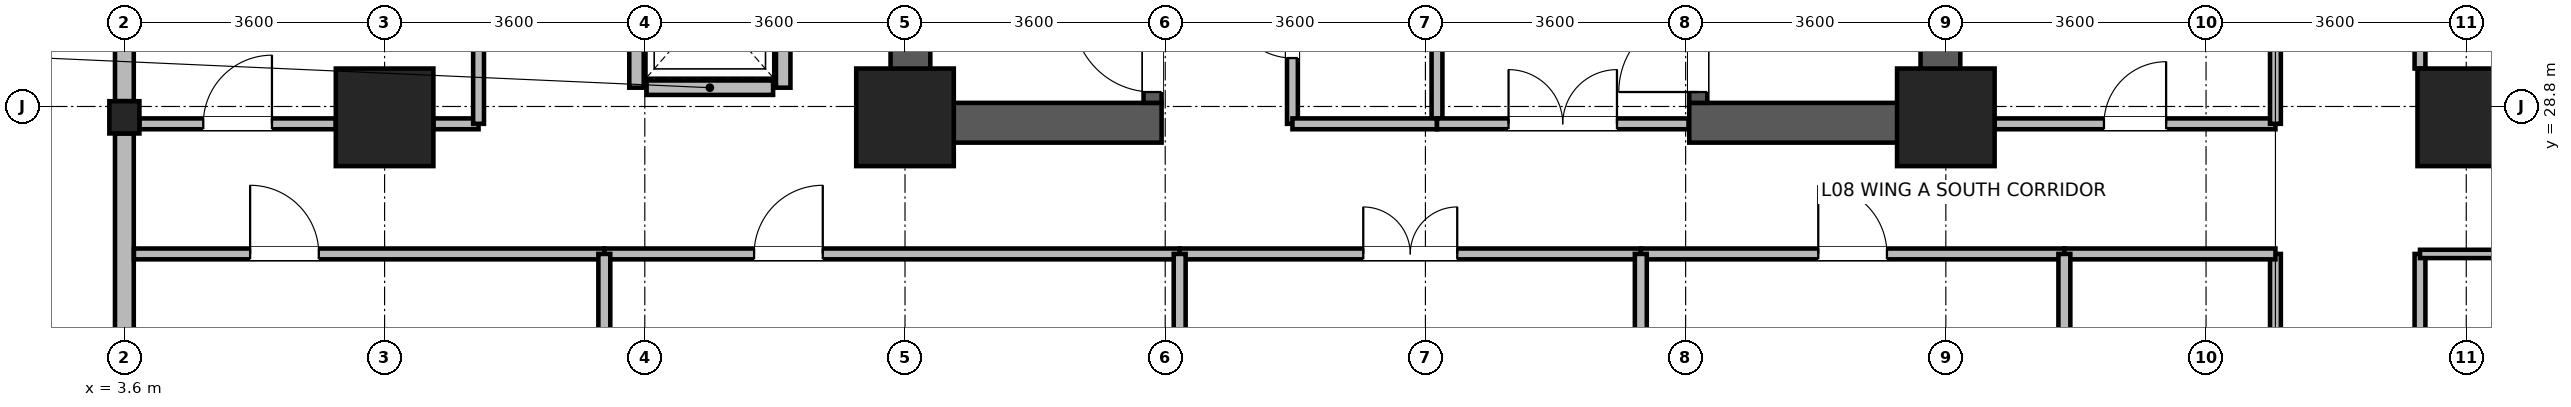
"""IFC4 building model, lengths in metres.
Left out: names, types, materials, properties, quantities, classifications, styles, units other than length and angle.
Written with IfcOpenShell. Run it as: python <this file> out.ifc"""

import sys

from ifc_helpers import new_model, si_unit, direction, frame, frame_2d, origin, origin_2d, place, context, subcontext, project, spatial, rectangle, i_section, extrude, source, transform, mapped, element, fill, save


model = new_model("IFC4")
c1 = context("Model", 3, precision=1e-05, world=origin(), true_north=direction((0.0, 1.0)))
c2 = subcontext(c1, "Body", "Model", "MODEL_VIEW")
j1 = project(units=[si_unit("LENGTHUNIT", "METRE"), si_unit("PLANEANGLEUNIT", "RADIAN")], contexts=[c1])
p1 = place(None, origin())
s1 = spatial("IfcSite", under=j1, at=p1, CompositionType="ELEMENT")
p2 = place(p1, origin())
s2 = spatial("IfcBuilding", under=s1, at=p2, CompositionType="ELEMENT")
p3 = place(p2, frame((0.0, 0.0, 36.4)))
s3 = spatial("IfcBuildingStorey", under=s2, at=p3, CompositionType="ELEMENT", Elevation=36.4)
for number, where, z_axis, x_axis in (
    (1, (14.475, 28.3, 0.0), (0.0, 0.0, 1.0), (0.0, 1.0, 0.0)),
    (2, (28.725, 28.3, 0.0), (0.0, 0.0, 1.0), (0.0, 1.0, 0.0)),
):
    element("IfcWall", number, at=place(p3, frame(where, z_axis=z_axis, x_axis=x_axis)), inside=s3, PredefinedType="SHEAR", context=c2, shape_type="SweptSolid", body=[
        extrude(rectangle(XDim=8.1, YDim=0.55, at=frame_2d((4.05, 0.0))), origin(), (0.0, 0.0, 1.0), 3.45),
    ])
for number, where, z_axis, x_axis in (
    (3, (14.75, 28.575, 0.0), (0.0, 0.0, 1.0), (1.0, 0.0, 0.0)),
    (4, (25.25, 28.575, 0.0), (0.0, 0.0, 1.0), (1.0, 0.0, 0.0)),
):
    element("IfcWall", number, at=place(p3, frame(where, z_axis=z_axis, x_axis=x_axis)), inside=s3, PredefinedType="SHEAR", context=c2, shape_type="SweptSolid", body=[
        extrude(rectangle(XDim=3.2, YDim=0.55, at=frame_2d((1.6, 0.0))), origin(), (0.0, 0.0, 1.0), 3.45),
    ])
p4 = place(p3, frame((17.825, 28.85, 0.0), z_axis=(0.0, 0.0, 1.0), x_axis=(0.0, 1.0, 0.0)))
e5 = element("IfcWall", 5, at=p4, inside=s3, PredefinedType="SHEAR", context=c2, shape_type="SweptSolid", body=[
    extrude(rectangle(XDim=7.0, YDim=0.25, at=frame_2d((3.5, 0.0))), origin(), (0.0, 0.0, 1.0), 3.45),
])
p5 = place(p4, frame((0.15, 0.0, 0.0)))
e6 = element("IfcOpeningElement", 6, at=p5, cuts=e5, PredefinedType="OPENING", context=c2, shape_type="SweptSolid", body=[
    extrude(rectangle(XDim=1.1, YDim=2.08, at=frame_2d((0.55, 1.04))), frame((0.0, 0.135, 0.0), z_axis=(0.0, -1.0, 0.0), x_axis=(1.0, 0.0, 0.0)), (0.0, 0.0, 1.0), 0.27),
])
p6 = place(p3, frame((25.375, 28.85, 0.0), z_axis=(0.0, 0.0, 1.0), x_axis=(0.0, 1.0, 0.0)))
e7 = element("IfcWall", 7, at=p6, inside=s3, PredefinedType="SHEAR", context=c2, shape_type="SweptSolid", body=[
    extrude(rectangle(XDim=7.0, YDim=0.25, at=frame_2d((3.5, 0.0))), origin(), (0.0, 0.0, 1.0), 3.45),
])
p7 = place(p6, frame((0.15, 0.0, 0.0)))
e8 = element("IfcOpeningElement", 8, at=p7, cuts=e7, PredefinedType="OPENING", context=c2, shape_type="SweptSolid", body=[
    extrude(rectangle(XDim=1.1, YDim=2.08, at=frame_2d((0.55, 1.04))), frame((0.0, 0.135, 0.0), z_axis=(0.0, -1.0, 0.0), x_axis=(1.0, 0.0, 0.0)), (0.0, 0.0, 1.0), 0.27),
])
m1 = source(origin(), c2, "Body", "SweptSolid", [
    extrude(rectangle(XDim=1.35, YDim=1.35, at=origin_2d()), origin(), (0.0, 0.0, 1.0), 3.7),
])
for number, where, z_axis, x_axis in (
    (9, (7.2, 28.65, 0.0), (0.0, 0.0, 1.0), (1.0, 0.0, 0.0)),
    (10, (14.4, 28.65, 0.0), (0.0, 0.0, 1.0), (1.0, 0.0, 0.0)),
    (11, (28.8, 28.65, 0.0), (0.0, 0.0, 1.0), (1.0, 0.0, 0.0)),
    (12, (36.0, 28.65, 0.0), (0.0, 0.0, 1.0), (1.0, 0.0, 0.0)),
):
    element("IfcColumn", number, at=place(p3, frame(where, z_axis=z_axis, x_axis=x_axis)), inside=s3, PredefinedType="COLUMN", context=c2, shape_type="MappedRepresentation", body=[
        mapped(m1, transform((0.0, 0.0, 0.0), x_axis=(1.0, 0.0, 0.0), y_axis=(0.0, 1.0, 0.0), z_axis=(0.0, 0.0, 1.0), scale=1.0)),
    ])
m2 = source(origin(), c2, "Body", "SweptSolid", [
    extrude(i_section(OverallWidth=0.416, OverallDepth=0.446, WebThickness=0.029, FlangeThickness=0.04, FilletRadius=0.015, at=origin_2d()), origin(), (0.0, 0.0, 1.0), 3.7),
])
p8 = place(p3, frame((3.6, 28.65, 0.0), z_axis=(0.0, 0.0, 1.0), x_axis=(1.0, 0.0, 0.0)))
e13 = element("IfcColumn", 13, at=p8, inside=s3, PredefinedType="COLUMN", context=c2, shape_type="MappedRepresentation", body=[
    mapped(m2, transform((0.0, 0.0, 0.0), x_axis=(1.0, 0.0, 0.0), y_axis=(0.0, 1.0, 0.0), z_axis=(0.0, 0.0, 1.0), scale=1.0)),
])
p9 = place(p3, frame((3.6, 28.874, 0.0), z_axis=(0.0, 0.0, 1.0), x_axis=(0.0, 1.0, 0.0)))
e14 = element("IfcWall", 14, at=p9, inside=s3, PredefinedType="STANDARD", context=c2, shape_type="SweptSolid", body=[
    extrude(rectangle(XDim=7.052, YDim=0.26, at=frame_2d((3.526, 0.0))), origin(), (0.0, 0.0, 1.0), 2.93),
])
p10 = place(p9, frame((0.863, 0.0, 0.85)))
e15 = element("IfcOpeningElement", 15, at=p10, cuts=e14, PredefinedType="OPENING", context=c2, shape_type="SweptSolid", body=[
    extrude(rectangle(XDim=1.8, YDim=1.85, at=frame_2d((0.9, 0.925))), frame((0.0, 0.14, 0.0), z_axis=(0.0, -1.0, 0.0), x_axis=(1.0, 0.0, 0.0)), (0.0, 0.0, 1.0), 0.28),
])
p11 = place(p9, frame((4.389, 0.0, 0.85)))
e16 = element("IfcOpeningElement", 16, at=p11, cuts=e14, PredefinedType="OPENING", context=c2, shape_type="SweptSolid", body=[
    extrude(rectangle(XDim=1.8, YDim=1.85, at=frame_2d((0.9, 0.925))), frame((0.0, 0.14, 0.0), z_axis=(0.0, -1.0, 0.0), x_axis=(1.0, 0.0, 0.0)), (0.0, 0.0, 1.0), 0.28),
])
p12 = place(p3, frame((3.6, 21.47, 0.0), z_axis=(0.0, 0.0, 1.0), x_axis=(0.0, 1.0, 0.0)))
e17 = element("IfcWall", 17, at=p12, inside=s3, PredefinedType="STANDARD", context=c2, shape_type="SweptSolid", body=[
    extrude(rectangle(XDim=6.956, YDim=0.26, at=frame_2d((3.478, 0.0))), origin(), (0.0, 0.0, 1.0), 3.43),
])
p13 = place(p12, frame((0.839, 0.0, 0.85)))
e18 = element("IfcOpeningElement", 18, at=p13, cuts=e17, PredefinedType="OPENING", context=c2, shape_type="SweptSolid", body=[
    extrude(rectangle(XDim=1.8, YDim=1.85, at=frame_2d((0.9, 0.925))), frame((0.0, 0.14, 0.0), z_axis=(0.0, -1.0, 0.0), x_axis=(1.0, 0.0, 0.0)), (0.0, 0.0, 1.0), 0.28),
])
p14 = place(p12, frame((3.003, 0.0, 0.85)))
e19 = element("IfcOpeningElement", 19, at=p14, cuts=e17, PredefinedType="OPENING", context=c2, shape_type="SweptSolid", body=[
    extrude(rectangle(XDim=0.95, YDim=1.75, at=frame_2d((0.475, 0.875))), frame((0.0, 0.14, 0.0), z_axis=(0.0, -1.0, 0.0), x_axis=(1.0, 0.0, 0.0)), (0.0, 0.0, 1.0), 0.28),
])
p15 = place(p3, frame((10.825, 29.06, 0.0), z_axis=(0.0, 0.0, 1.0), x_axis=(1.0, 0.0, 0.0)))
e20 = element("IfcWall", 20, at=p15, inside=s3, PredefinedType="PARTITIONING", context=c2, shape_type="SweptSolid", body=[
    extrude(rectangle(XDim=1.75, YDim=0.2, at=frame_2d((0.875, 0.0))), origin(), (0.0, 0.0, 1.0), 3.43),
])
for number, where, z_axis, x_axis in (
    (21, (10.685, 29.06, 0.0), (0.0, 0.0, 1.0), (0.0, 1.0, 0.0)),
    (22, (12.715, 29.06, 0.0), (0.0, 0.0, 1.0), (0.0, 1.0, 0.0)),
):
    element("IfcWall", number, at=place(p3, frame(where, z_axis=z_axis, x_axis=x_axis)), inside=s3, PredefinedType="PARTITIONING", context=c2, shape_type="SweptSolid", body=[
        extrude(rectangle(XDim=2.28, YDim=0.2, at=frame_2d((1.14, 0.0))), origin(), (0.0, 0.0, 1.0), 3.43),
    ])
p16 = place(p3, frame((35.36, 22.275, 0.0), z_axis=(0.0, 0.0, 1.0), x_axis=(0.0, 1.0, 0.0)))
e23 = element("IfcWall", 23, at=p16, inside=s3, PredefinedType="PARTITIONING", context=c2, shape_type="SweptSolid", body=[
    extrude(rectangle(XDim=4.485, YDim=0.15, at=frame_2d((2.243, 0.0))), origin(), (0.0, 0.0, 1.0), 3.43),
])
p17 = place(p3, frame((10.24, 26.76, 0.0), z_axis=(0.0, 0.0, 1.0), x_axis=(1.0, 0.0, 0.0)))
e24 = element("IfcWall", 24, at=p17, inside=s3, PredefinedType="PARTITIONING", context=c2, shape_type="SweptSolid", body=[
    extrude(rectangle(XDim=7.96, YDim=0.15, at=frame_2d((3.98, 0.0))), origin(), (0.0, 0.0, 1.0), 3.43),
])
p18 = place(p17, frame((2.072, 0.0, 0.0)))
e25 = element("IfcOpeningElement", 25, at=p18, cuts=e24, PredefinedType="OPENING", context=c2, shape_type="SweptSolid", body=[
    extrude(rectangle(XDim=0.95, YDim=2.1, at=frame_2d((0.475, 1.05))), frame((0.0, 0.085, 0.0), z_axis=(0.0, -1.0, 0.0), x_axis=(1.0, 0.0, 0.0)), (0.0, 0.0, 1.0), 0.17),
])
p19 = place(p3, frame((35.36, 29.325, 0.0), z_axis=(0.0, 0.0, 1.0), x_axis=(0.0, 1.0, 0.0)))
e26 = element("IfcWall", 26, at=p19, inside=s3, PredefinedType="PARTITIONING", context=c2, shape_type="SweptSolid", body=[
    extrude(rectangle(XDim=6.15, YDim=0.15, at=frame_2d((3.075, 0.0))), origin(), (0.0, 0.0, 1.0), 3.43),
])
p20 = place(p19, frame((2.425, 0.0, 0.0)))
e27 = element("IfcOpeningElement", 27, at=p20, cuts=e26, PredefinedType="OPENING", context=c2, shape_type="SweptSolid", body=[
    extrude(rectangle(XDim=1.3, YDim=2.12, at=frame_2d((0.65, 1.06))), frame((0.0, 0.085, 0.0), z_axis=(0.0, -1.0, 0.0), x_axis=(1.0, 0.0, 0.0)), (0.0, 0.0, 1.0), 0.17),
])
p21 = place(p3, frame((3.732, 26.76, 0.0), z_axis=(0.0, 0.0, 1.0), x_axis=(1.0, 0.0, 0.0)))
e28 = element("IfcWall", 28, at=p21, inside=s3, PredefinedType="PARTITIONING", context=c2, shape_type="SweptSolid", body=[
    extrude(rectangle(XDim=6.508, YDim=0.15, at=frame_2d((3.254, 0.0))), origin(), (0.0, 0.0, 1.0), 3.43),
])
p22 = place(p21, frame((1.608, 0.0, 0.0)))
e29 = element("IfcOpeningElement", 29, at=p22, cuts=e28, PredefinedType="OPENING", context=c2, shape_type="SweptSolid", body=[
    extrude(rectangle(XDim=0.95, YDim=2.1, at=frame_2d((0.475, 1.05))), frame((0.0, 0.085, 0.0), z_axis=(0.0, -1.0, 0.0), x_axis=(1.0, 0.0, 0.0)), (0.0, 0.0, 1.0), 0.17),
])
p23 = place(p3, frame((18.2, 26.76, 0.0), z_axis=(0.0, 0.0, 1.0), x_axis=(1.0, 0.0, 0.0)))
e30 = element("IfcWall", 30, at=p23, inside=s3, PredefinedType="PARTITIONING", context=c2, shape_type="SweptSolid", body=[
    extrude(rectangle(XDim=6.38, YDim=0.15, at=frame_2d((3.19, 0.0))), origin(), (0.0, 0.0, 1.0), 3.43),
])
p24 = place(p23, frame((2.54, 0.0, 0.0)))
e31 = element("IfcOpeningElement", 31, at=p24, cuts=e30, PredefinedType="OPENING", context=c2, shape_type="SweptSolid", body=[
    extrude(rectangle(XDim=1.3, YDim=2.12, at=frame_2d((0.65, 1.06))), frame((0.0, 0.085, 0.0), z_axis=(0.0, -1.0, 0.0), x_axis=(1.0, 0.0, 0.0)), (0.0, 0.0, 1.0), 0.17),
])
p25 = place(p3, frame((24.58, 26.76, 0.0), z_axis=(0.0, 0.0, 1.0), x_axis=(1.0, 0.0, 0.0)))
e32 = element("IfcWall", 32, at=p25, inside=s3, PredefinedType="PARTITIONING", context=c2, shape_type="SweptSolid", body=[
    extrude(rectangle(XDim=5.86, YDim=0.15, at=frame_2d((2.93, 0.0))), origin(), (0.0, 0.0, 1.0), 3.43),
])
p26 = place(p25, frame((2.455, 0.0, 0.0)))
e33 = element("IfcOpeningElement", 33, at=p26, cuts=e32, PredefinedType="OPENING", context=c2, shape_type="SweptSolid", body=[
    extrude(rectangle(XDim=0.95, YDim=2.1, at=frame_2d((0.475, 1.05))), frame((0.0, 0.085, 0.0), z_axis=(0.0, -1.0, 0.0), x_axis=(1.0, 0.0, 0.0)), (0.0, 0.0, 1.0), 0.17),
])
p27 = place(p3, frame((33.36, 21.6, 0.0), z_axis=(0.0, 0.0, 1.0), x_axis=(0.0, 1.0, 0.0)))
e34 = element("IfcWall", 34, at=p27, inside=s3, PredefinedType="PARTITIONING", context=c2, shape_type="SweptSolid", body=[
    extrude(rectangle(XDim=5.16, YDim=0.15, at=frame_2d((2.58, 0.0))), origin(), (0.0, 0.0, 1.0), 3.43),
])
p28 = place(p27, frame((2.15, 0.0, 0.0)))
e35 = element("IfcOpeningElement", 35, at=p28, cuts=e34, PredefinedType="OPENING", context=c2, shape_type="SweptSolid", body=[
    extrude(rectangle(XDim=0.86, YDim=2.02, at=frame_2d((0.43, 1.01))), frame((0.0, 0.085, 0.0), z_axis=(0.0, -1.0, 0.0), x_axis=(1.0, 0.0, 0.0)), (0.0, 0.0, 1.0), 0.17),
])
p29 = place(p3, frame((3.808, 28.56, 0.0), z_axis=(0.0, 0.0, 1.0), x_axis=(1.0, 0.0, 0.0)))
e36 = element("IfcWall", 36, at=p29, inside=s3, PredefinedType="PARTITIONING", context=c2, shape_type="SweptSolid", body=[
    extrude(rectangle(XDim=2.717, YDim=0.15, at=frame_2d((1.358, 0.0))), origin(), (0.0, 0.0, 1.0), 2.78),
])
p30 = place(p29, frame((0.884, 0.0, 0.0)))
e37 = element("IfcOpeningElement", 37, at=p30, cuts=e36, PredefinedType="OPENING", context=c2, shape_type="SweptSolid", body=[
    extrude(rectangle(XDim=0.95, YDim=2.1, at=frame_2d((0.475, 1.05))), frame((0.0, 0.085, 0.0), z_axis=(0.0, -1.0, 0.0), x_axis=(1.0, 0.0, 0.0)), (0.0, 0.0, 1.0), 0.17),
])
p31 = place(p3, frame((7.875, 28.56, 0.0), z_axis=(0.0, 0.0, 1.0), x_axis=(1.0, 0.0, 0.0)))
e38 = element("IfcWall", 38, at=p31, inside=s3, PredefinedType="PARTITIONING", context=c2, shape_type="SweptSolid", body=[
    extrude(rectangle(XDim=0.625, YDim=0.15, at=frame_2d((0.312, 0.0))), origin(), (0.0, 0.0, 1.0), 2.78),
])
p32 = place(p3, frame((29.475, 28.56, 0.0), z_axis=(0.0, 0.0, 1.0), x_axis=(1.0, 0.0, 0.0)))
e39 = element("IfcWall", 39, at=p32, inside=s3, PredefinedType="PARTITIONING", context=c2, shape_type="SweptSolid", body=[
    extrude(rectangle(XDim=3.885, YDim=0.15, at=frame_2d((1.942, 0.0))), origin(), (0.0, 0.0, 1.0), 2.78),
])
p33 = place(p32, frame((1.512, 0.0, 0.0)))
e40 = element("IfcOpeningElement", 40, at=p33, cuts=e39, PredefinedType="OPENING", context=c2, shape_type="SweptSolid", body=[
    extrude(rectangle(XDim=0.86, YDim=2.02, at=frame_2d((0.43, 1.01))), frame((0.0, 0.085, 0.0), z_axis=(0.0, -1.0, 0.0), x_axis=(1.0, 0.0, 0.0)), (0.0, 0.0, 1.0), 0.17),
])
p34 = place(p3, frame((8.5, 28.56, 0.0), z_axis=(0.0, 0.0, 1.0), x_axis=(0.0, 1.0, 0.0)))
e41 = element("IfcWall", 41, at=p34, inside=s3, PredefinedType="PARTITIONING", context=c2, shape_type="SweptSolid", body=[
    extrude(rectangle(XDim=3.84, YDim=0.15, at=frame_2d((1.92, 0.0))), origin(), (0.0, 0.0, 1.0), 3.43),
])
p35 = place(p3, frame((33.36, 28.56, 0.0), z_axis=(0.0, 0.0, 1.0), x_axis=(0.0, 1.0, 0.0)))
e42 = element("IfcWall", 42, at=p35, inside=s3, PredefinedType="PARTITIONING", context=c2, shape_type="SweptSolid", body=[
    extrude(rectangle(XDim=3.08, YDim=0.15, at=frame_2d((1.54, 0.0))), origin(), (0.0, 0.0, 1.0), 3.43),
])
p36 = place(p3, frame((30.44, 26.76, 0.0), z_axis=(0.0, 0.0, 1.0), x_axis=(1.0, 0.0, 0.0)))
e43 = element("IfcWall", 43, at=p36, inside=s3, PredefinedType="PARTITIONING", context=c2, shape_type="SweptSolid", body=[
    extrude(rectangle(XDim=2.92, YDim=0.15, at=frame_2d((1.46, 0.0))), origin(), (0.0, 0.0, 1.0), 3.43),
])
p37 = place(p3, frame((19.76, 28.56, 0.0), z_axis=(0.0, 0.0, 1.0), x_axis=(0.0, 1.0, 0.0)))
e44 = element("IfcWall", 44, at=p37, inside=s3, PredefinedType="PARTITIONING", context=c2, shape_type="SweptSolid", body=[
    extrude(rectangle(XDim=2.68, YDim=0.15, at=frame_2d((1.34, 0.0))), origin(), (0.0, 0.0, 1.0), 3.43),
])
p38 = place(p37, frame((0.91, 0.0, 0.0)))
e45 = element("IfcOpeningElement", 45, at=p38, cuts=e44, PredefinedType="OPENING", context=c2, shape_type="SweptSolid", body=[
    extrude(rectangle(XDim=0.86, YDim=2.02, at=frame_2d((0.43, 1.01))), frame((0.0, 0.085, 0.0), z_axis=(0.0, -1.0, 0.0), x_axis=(1.0, 0.0, 0.0)), (0.0, 0.0, 1.0), 0.17),
])
p39 = place(p3, frame((21.76, 28.56, 0.0), z_axis=(0.0, 0.0, 1.0), x_axis=(0.0, 1.0, 0.0)))
e46 = element("IfcWall", 46, at=p39, inside=s3, PredefinedType="PARTITIONING", context=c2, shape_type="SweptSolid", body=[
    extrude(rectangle(XDim=2.68, YDim=0.15, at=frame_2d((1.34, 0.0))), origin(), (0.0, 0.0, 1.0), 3.43),
])
p40 = place(p3, frame((19.76, 28.56, 0.0), z_axis=(0.0, 0.0, 1.0), x_axis=(1.0, 0.0, 0.0)))
e47 = element("IfcWall", 47, at=p40, inside=s3, PredefinedType="PARTITIONING", context=c2, shape_type="SweptSolid", body=[
    extrude(rectangle(XDim=2.0, YDim=0.15, at=frame_2d((1.0, 0.0))), origin(), (0.0, 0.0, 1.0), 2.23),
])
p41 = place(p3, frame((18.2, 21.732, 0.0), z_axis=(0.0, 0.0, 1.0), x_axis=(0.0, 1.0, 0.0)))
e48 = element("IfcWall", 48, at=p41, inside=s3, PredefinedType="PARTITIONING", context=c2, shape_type="SweptSolid", body=[
    extrude(rectangle(XDim=5.028, YDim=0.165, at=frame_2d((2.514, 0.0))), origin(), (0.0, 0.0, 1.0), 3.07),
])
p42 = place(p3, frame((24.58, 21.732, 0.0), z_axis=(0.0, 0.0, 1.0), x_axis=(0.0, 1.0, 0.0)))
e49 = element("IfcWall", 49, at=p42, inside=s3, PredefinedType="PARTITIONING", context=c2, shape_type="SweptSolid", body=[
    extrude(rectangle(XDim=5.028, YDim=0.165, at=frame_2d((2.514, 0.0))), origin(), (0.0, 0.0, 1.0), 3.43),
])
p43 = place(p3, frame((30.44, 21.6, 0.0), z_axis=(0.0, 0.0, 1.0), x_axis=(0.0, 1.0, 0.0)))
e50 = element("IfcWall", 50, at=p43, inside=s3, PredefinedType="PARTITIONING", context=c2, shape_type="SweptSolid", body=[
    extrude(rectangle(XDim=5.16, YDim=0.165, at=frame_2d((2.58, 0.0))), origin(), (0.0, 0.0, 1.0), 3.43),
])
p44 = place(p3, frame((35.36, 26.76, 0.0), z_axis=(0.0, 0.0, 1.0), x_axis=(1.0, 0.0, 0.0)))
e51 = element("IfcWall", 51, at=p44, inside=s3, PredefinedType="PARTITIONING", context=c2, shape_type="SweptSolid", body=[
    extrude(rectangle(XDim=4.92, YDim=0.115, at=frame_2d((2.46, 0.0))), origin(), (0.0, 0.0, 1.0), 3.43),
])
p45 = place(p3, frame((21.76, 28.56, 0.0), z_axis=(0.0, 0.0, 1.0), x_axis=(1.0, 0.0, 0.0)))
e52 = element("IfcWall", 52, at=p45, inside=s3, PredefinedType="PARTITIONING", context=c2, shape_type="SweptSolid", body=[
    extrude(rectangle(XDim=3.48, YDim=0.15, at=frame_2d((1.74, 0.0))), origin(), (0.0, 0.0, 1.0), 2.23),
])
p46 = place(p45, frame((0.99, 0.0, 0.0)))
e53 = element("IfcOpeningElement", 53, at=p46, cuts=e52, PredefinedType="OPENING", context=c2, shape_type="SweptSolid", body=[
    extrude(rectangle(XDim=1.5, YDim=2.1, at=frame_2d((0.75, 1.05))), frame((0.0, 0.085, 0.0), z_axis=(0.0, -1.0, 0.0), x_axis=(1.0, 0.0, 0.0)), (0.0, 0.0, 1.0), 0.17),
])
p47 = place(p3, frame((10.24, 23.5, 0.0), z_axis=(0.0, 0.0, 1.0), x_axis=(0.0, 1.0, 0.0)))
e54 = element("IfcWall", 54, at=p47, inside=s3, PredefinedType="PARTITIONING", context=c2, shape_type="SweptSolid", body=[
    extrude(rectangle(XDim=3.26, YDim=0.165, at=frame_2d((1.63, 0.0))), origin(), (0.0, 0.0, 1.0), 3.43),
])
p48 = place(p5, origin())
e55 = element("IfcDoor", 55, at=p48, inside=s3, OperationType="SINGLE_SWING_RIGHT", PredefinedType="DOOR", context=c2, shape_type="SweptSolid", body=[
    extrude(rectangle(XDim=1.1, YDim=2.08, at=frame_2d((0.55, 1.04))), frame((0.0, 0.025, 0.0), z_axis=(0.0, -1.0, 0.0), x_axis=(1.0, 0.0, 0.0)), (0.0, 0.0, 1.0), 0.05),
])
fill(e6, e55)
p49 = place(p7, origin())
e56 = element("IfcDoor", 56, at=p49, inside=s3, OperationType="SINGLE_SWING_LEFT", PredefinedType="DOOR", context=c2, shape_type="SweptSolid", body=[
    extrude(rectangle(XDim=1.1, YDim=2.08, at=frame_2d((0.55, 1.04))), frame((0.0, 0.025, 0.0), z_axis=(0.0, -1.0, 0.0), x_axis=(1.0, 0.0, 0.0)), (0.0, 0.0, 1.0), 0.05),
])
fill(e8, e56)
p50 = place(p18, origin())
e57 = element("IfcDoor", 57, at=p50, inside=s3, OperationType="SINGLE_SWING_RIGHT", PredefinedType="DOOR", context=c2, shape_type="SweptSolid", body=[
    extrude(rectangle(XDim=0.95, YDim=2.1, at=frame_2d((0.475, 1.05))), frame((0.0, 0.025, 0.0), z_axis=(0.0, -1.0, 0.0), x_axis=(1.0, 0.0, 0.0)), (0.0, 0.0, 1.0), 0.05),
])
fill(e25, e57)
p51 = place(p22, origin())
e58 = element("IfcDoor", 58, at=p51, inside=s3, OperationType="SINGLE_SWING_LEFT", PredefinedType="DOOR", context=c2, shape_type="SweptSolid", body=[
    extrude(rectangle(XDim=0.95, YDim=2.1, at=frame_2d((0.475, 1.05))), frame((0.0, 0.025, 0.0), z_axis=(0.0, -1.0, 0.0), x_axis=(1.0, 0.0, 0.0)), (0.0, 0.0, 1.0), 0.05),
])
fill(e29, e58)
p52 = place(p24, origin())
e59 = element("IfcDoor", 59, at=p52, inside=s3, OperationType="DOUBLE_DOOR_SINGLE_SWING", PredefinedType="DOOR", context=c2, shape_type="SweptSolid", body=[
    extrude(rectangle(XDim=1.3, YDim=2.12, at=frame_2d((0.65, 1.06))), frame((0.0, 0.025, 0.0), z_axis=(0.0, -1.0, 0.0), x_axis=(1.0, 0.0, 0.0)), (0.0, 0.0, 1.0), 0.05),
])
fill(e31, e59)
p53 = place(p26, origin())
e60 = element("IfcDoor", 60, at=p53, inside=s3, OperationType="SINGLE_SWING_LEFT", PredefinedType="DOOR", context=c2, shape_type="SweptSolid", body=[
    extrude(rectangle(XDim=0.95, YDim=2.1, at=frame_2d((0.475, 1.05))), frame((0.0, 0.025, 0.0), z_axis=(0.0, -1.0, 0.0), x_axis=(1.0, 0.0, 0.0)), (0.0, 0.0, 1.0), 0.05),
])
fill(e33, e60)
p54 = place(p30, origin())
e61 = element("IfcDoor", 61, at=p54, inside=s3, OperationType="SINGLE_SWING_RIGHT", PredefinedType="DOOR", context=c2, shape_type="SweptSolid", body=[
    extrude(rectangle(XDim=0.95, YDim=2.1, at=frame_2d((0.475, 1.05))), frame((0.0, 0.025, 0.0), z_axis=(0.0, -1.0, 0.0), x_axis=(1.0, 0.0, 0.0)), (0.0, 0.0, 1.0), 0.05),
])
fill(e37, e61)
p55 = place(p33, origin())
e62 = element("IfcDoor", 62, at=p55, inside=s3, OperationType="SINGLE_SWING_RIGHT", PredefinedType="DOOR", context=c2, shape_type="SweptSolid", body=[
    extrude(rectangle(XDim=0.86, YDim=2.02, at=frame_2d((0.43, 1.01))), frame((0.0, 0.025, 0.0), z_axis=(0.0, -1.0, 0.0), x_axis=(1.0, 0.0, 0.0)), (0.0, 0.0, 1.0), 0.05),
])
fill(e40, e62)
p56 = place(p38, origin())
e63 = element("IfcDoor", 63, at=p56, inside=s3, OperationType="SINGLE_SWING_RIGHT", PredefinedType="DOOR", context=c2, shape_type="SweptSolid", body=[
    extrude(rectangle(XDim=0.86, YDim=2.02, at=frame_2d((0.43, 1.01))), frame((0.0, 0.025, 0.0), z_axis=(0.0, -1.0, 0.0), x_axis=(1.0, 0.0, 0.0)), (0.0, 0.0, 1.0), 0.05),
])
fill(e45, e63)
p57 = place(p46, origin())
e64 = element("IfcDoor", 64, at=p57, inside=s3, OperationType="DOUBLE_DOOR_SINGLE_SWING", PredefinedType="DOOR", context=c2, shape_type="SweptSolid", body=[
    extrude(rectangle(XDim=1.5, YDim=2.1, at=frame_2d((0.75, 1.05))), frame((0.0, 0.025, 0.0), z_axis=(0.0, -1.0, 0.0), x_axis=(1.0, 0.0, 0.0)), (0.0, 0.0, 1.0), 0.05),
])
fill(e53, e64)
save(model, sys.argv[1])
